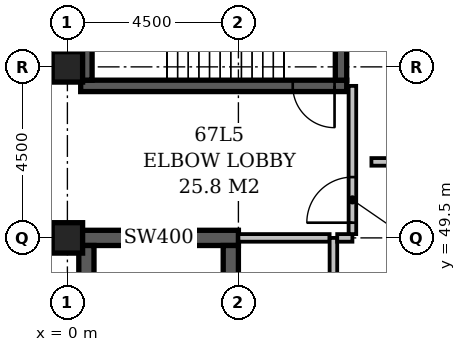
"""IFC4 building model, lengths in metres.
Left out: names, types, materials, properties, quantities, classifications, styles, units other than length and angle.
Written with IfcOpenShell. Run it as: python <this file> out.ifc"""

import sys

from ifc_helpers import new_model, si_unit, direction, frame, frame_2d, origin, origin_2d, place, context, subcontext, project, spatial, rectangle, extrude, element, fill, save


model = new_model("IFC4")
c1 = context("Model", 3, precision=1e-05, world=origin(), true_north=direction((0.0, 1.0)))
c2 = subcontext(c1, "Body", "Model", "MODEL_VIEW")
j1 = project(units=[si_unit("LENGTHUNIT", "METRE"), si_unit("PLANEANGLEUNIT", "RADIAN")], contexts=[c1])
p1 = place(None, origin())
s1 = spatial("IfcSite", under=j1, at=p1, CompositionType="ELEMENT")
p2 = place(p1, origin())
s2 = spatial("IfcBuilding", under=s1, at=p2, CompositionType="ELEMENT")
p3 = place(p2, frame((0.0, 0.0, 258.2)))
s3 = spatial("IfcBuildingStorey", under=s2, at=p3, CompositionType="ELEMENT", Elevation=258.2)
p4 = place(p3, frame((0.3, 49.5, -0.45), z_axis=(0.0, 0.0, 1.0), x_axis=(1.0, 0.0, 0.0)))
e1 = element("IfcWall", 1, at=p4, inside=s3, PredefinedType="SHEAR", context=c2, shape_type="SweptSolid", body=[
    extrude(rectangle(XDim=4.2, YDim=0.4, at=frame_2d((2.1, 0.0))), origin(), (0.0, 0.0, 1.0), 8.05),
])
p5 = place(p3, frame((0.35, 53.5, -0.45), z_axis=(0.0, 0.0, 1.0), x_axis=(1.0, 0.0, 0.0)))
e2 = element("IfcWall", 2, at=p5, inside=s3, PredefinedType="SHEAR", context=c2, shape_type="SweptSolid", body=[
    extrude(rectangle(XDim=7.0, YDim=0.3, at=frame_2d((3.5, 0.0))), origin(), (0.0, 0.0, 1.0), 8.05),
])
p6 = place(p5, frame((5.58, 0.0, 0.45)))
e3 = element("IfcOpeningElement", 3, at=p6, cuts=e2, PredefinedType="OPENING", context=c2, shape_type="SweptSolid", body=[
    extrude(rectangle(XDim=1.1, YDim=2.1, at=frame_2d((0.55, 1.05))), frame((0.0, 0.162, 0.0), z_axis=(0.0, -1.0, 0.0), x_axis=(1.0, 0.0, 0.0)), (0.0, 0.0, 1.0), 0.324),
])
p7 = place(p3, frame((0.5, 27.15, -0.45), z_axis=(0.0, 0.0, 1.0), x_axis=(0.0, 1.0, 0.0)))
e4 = element("IfcWall", 4, at=p7, inside=s3, PredefinedType="SHEAR", context=c2, shape_type="SweptSolid", body=[
    extrude(rectangle(XDim=22.15, YDim=0.4, at=frame_2d((11.075, 0.0))), origin(), (0.0, 0.0, 1.0), 8.05),
])
p8 = place(p3, frame((0.5, 53.65, -0.45), z_axis=(0.0, 0.0, 1.0), x_axis=(0.0, 1.0, 0.0)))
e5 = element("IfcWall", 5, at=p8, inside=s3, PredefinedType="SHEAR", context=c2, shape_type="SweptSolid", body=[
    extrude(rectangle(XDim=4.2, YDim=0.3, at=frame_2d((2.1, 0.0))), origin(), (0.0, 0.0, 1.0), 8.05),
])
p9 = place(p3, frame((4.3, 27.15, -0.45), z_axis=(0.0, 0.0, 1.0), x_axis=(0.0, 1.0, 0.0)))
e6 = element("IfcWall", 6, at=p9, inside=s3, PredefinedType="SHEAR", context=c2, shape_type="SweptSolid", body=[
    extrude(rectangle(XDim=22.15, YDim=0.4, at=frame_2d((11.075, 0.0))), origin(), (0.0, 0.0, 1.0), 8.05),
])
p10 = place(p9, frame((3.05, 0.0, 0.45)))
e7 = element("IfcOpeningElement", 7, at=p10, cuts=e6, PredefinedType="OPENING", context=c2, shape_type="SweptSolid", body=[
    extrude(rectangle(XDim=1.1, YDim=2.1, at=frame_2d((0.55, 1.05))), frame((0.0, 0.212, 0.0), z_axis=(0.0, -1.0, 0.0), x_axis=(1.0, 0.0, 0.0)), (0.0, 0.0, 1.0), 0.424),
])
p11 = place(p9, frame((0.55, 0.0, 0.45)))
e8 = element("IfcOpeningElement", 8, at=p11, cuts=e6, PredefinedType="OPENING", context=c2, shape_type="SweptSolid", body=[
    extrude(rectangle(XDim=1.1, YDim=2.1, at=frame_2d((0.55, 1.05))), frame((0.0, 0.212, 0.0), z_axis=(0.0, -1.0, 0.0), x_axis=(1.0, 0.0, 0.0)), (0.0, 0.0, 1.0), 0.424),
])
p12 = place(p9, frame((5.55, 0.0, 0.45)))
e9 = element("IfcOpeningElement", 9, at=p12, cuts=e6, PredefinedType="OPENING", context=c2, shape_type="SweptSolid", body=[
    extrude(rectangle(XDim=1.1, YDim=2.1, at=frame_2d((0.55, 1.05))), frame((0.0, 0.212, 0.0), z_axis=(0.0, -1.0, 0.0), x_axis=(1.0, 0.0, 0.0)), (0.0, 0.0, 1.0), 0.424),
])
p13 = place(p3, frame((7.2, 53.65, -0.45), z_axis=(0.0, 0.0, 1.0), x_axis=(0.0, 1.0, 0.0)))
e10 = element("IfcWall", 10, at=p13, inside=s3, PredefinedType="SHEAR", context=c2, shape_type="SweptSolid", body=[
    extrude(rectangle(XDim=4.2, YDim=0.3, at=frame_2d((2.1, 0.0))), origin(), (0.0, 0.0, 1.0), 8.05),
])
for number, where, z_axis, x_axis in (
    (11, (0.0, 49.5, -0.45), (0.0, 0.0, 1.0), (1.0, 0.0, 0.0)),
    (12, (0.0, 54.0, -0.45), (0.0, 0.0, 1.0), (1.0, 0.0, 0.0)),
):
    element("IfcColumn", number, at=place(p3, frame(where, z_axis=z_axis, x_axis=x_axis)), inside=s3, PredefinedType="COLUMN", context=c2, shape_type="SweptSolid", body=[
        extrude(rectangle(XDim=0.8, YDim=0.8, at=origin_2d()), origin(), (0.0, 0.0, 1.0), 8.05),
    ])
p14 = place(p3, frame((7.0, 34.6, 0.0), z_axis=(0.0, 0.0, 1.0), x_axis=(0.0, 1.0, 0.0)))
e13 = element("IfcWall", 13, at=p14, inside=s3, PredefinedType="PARTITIONING", context=c2, shape_type="SweptSolid", body=[
    extrude(rectangle(XDim=14.9, YDim=0.2, at=frame_2d((7.45, 0.0))), origin(), (0.0, 0.0, 1.0), 7.6),
])
p15 = place(p14, frame((2.8, 0.0, 0.0)))
e14 = element("IfcOpeningElement", 14, at=p15, cuts=e13, PredefinedType="OPENING", context=c2, shape_type="SweptSolid", body=[
    extrude(rectangle(XDim=1.2, YDim=2.1, at=frame_2d((0.6, 1.05))), frame((0.0, 0.112, 0.0), z_axis=(0.0, -1.0, 0.0), x_axis=(1.0, 0.0, 0.0)), (0.0, 0.0, 1.0), 0.224),
])
p16 = place(p14, frame((9.8, 0.0, 0.0)))
e15 = element("IfcOpeningElement", 15, at=p16, cuts=e13, PredefinedType="OPENING", context=c2, shape_type="SweptSolid", body=[
    extrude(rectangle(XDim=1.2, YDim=2.1, at=frame_2d((0.6, 1.05))), frame((0.0, 0.112, 0.0), z_axis=(0.0, -1.0, 0.0), x_axis=(1.0, 0.0, 0.0)), (0.0, 0.0, 1.0), 0.224),
])
p17 = place(p3, frame((4.5, 49.5, 0.0), z_axis=(0.0, 0.0, 1.0), x_axis=(1.0, 0.0, 0.0)))
e16 = element("IfcWall", 16, at=p17, inside=s3, PredefinedType="PARTITIONING", context=c2, shape_type="SweptSolid", body=[
    extrude(rectangle(XDim=2.4, YDim=0.2, at=frame_2d((1.2, 0.0))), origin(), (0.0, 0.0, 1.0), 7.6),
])
p18 = place(p3, frame((7.1, 49.5, 0.0), z_axis=(0.0, 0.0, 1.0), x_axis=(1.0, 0.0, 0.0)))
e17 = element("IfcWall", 17, at=p18, inside=s3, PredefinedType="PARTITIONING", context=c2, shape_type="SweptSolid", body=[
    extrude(rectangle(XDim=0.4, YDim=0.2, at=frame_2d((0.2, 0.0))), origin(), (0.0, 0.0, 1.0), 7.6),
])
p19 = place(p3, frame((7.5, 49.6, 0.0), z_axis=(0.0, 0.0, 1.0), x_axis=(0.0, 1.0, 0.0)))
e18 = element("IfcWall", 18, at=p19, inside=s3, PredefinedType="PARTITIONING", context=c2, shape_type="SweptSolid", body=[
    extrude(rectangle(XDim=3.9, YDim=0.2, at=frame_2d((1.95, 0.0))), origin(), (0.0, 0.0, 1.0), 7.6),
])
p20 = place(p19, frame((0.3, 0.0, 0.0)))
e19 = element("IfcOpeningElement", 19, at=p20, cuts=e18, PredefinedType="OPENING", context=c2, shape_type="SweptSolid", body=[
    extrude(rectangle(XDim=1.2, YDim=2.1, at=frame_2d((0.6, 1.05))), frame((0.0, 0.112, 0.0), z_axis=(0.0, -1.0, 0.0), x_axis=(1.0, 0.0, 0.0)), (0.0, 0.0, 1.0), 0.224),
])
p21 = place(p3, frame((15.6, 51.5, 0.0), z_axis=(0.0, 0.0, 1.0), x_axis=(-1.0, 0.0, 0.0)))
e20 = element("IfcWall", 20, at=p21, inside=s3, PredefinedType="PARTITIONING", context=c2, shape_type="SweptSolid", body=[
    extrude(rectangle(XDim=7.6, YDim=0.2, at=frame_2d((3.8, 0.0))), origin(), (0.0, 0.0, 1.0), 7.6),
])
p22 = place(p21, frame((3.2, 0.0, 0.0)))
e21 = element("IfcOpeningElement", 21, at=p22, cuts=e20, PredefinedType="OPENING", context=c2, shape_type="SweptSolid", body=[
    extrude(rectangle(XDim=1.2, YDim=2.1, at=frame_2d((0.6, 1.05))), frame((0.0, 0.112, 0.0), z_axis=(0.0, -1.0, 0.0), x_axis=(1.0, 0.0, 0.0)), (0.0, 0.0, 1.0), 0.224),
])
p23 = place(p20, origin())
e22 = element("IfcDoor", 22, at=p23, inside=s3, OperationType="SINGLE_SWING_LEFT", PredefinedType="DOOR", context=c2, shape_type="SweptSolid", body=[
    extrude(rectangle(XDim=1.2, YDim=2.1, at=frame_2d((0.6, 1.05))), frame((0.0, 0.025, 0.0), z_axis=(0.0, -1.0, 0.0), x_axis=(1.0, 0.0, 0.0)), (0.0, 0.0, 1.0), 0.05),
])
fill(e19, e22)
p24 = place(p6, origin())
e23 = element("IfcDoor", 23, at=p24, inside=s3, OperationType="SINGLE_SWING_RIGHT", PredefinedType="DOOR", context=c2, shape_type="SweptSolid", body=[
    extrude(rectangle(XDim=1.1, YDim=2.1, at=frame_2d((0.55, 1.05))), frame((0.0, 0.025, 0.0), z_axis=(0.0, -1.0, 0.0), x_axis=(1.0, 0.0, 0.0)), (0.0, 0.0, 1.0), 0.05),
])
fill(e3, e23)
save(model, sys.argv[1])
